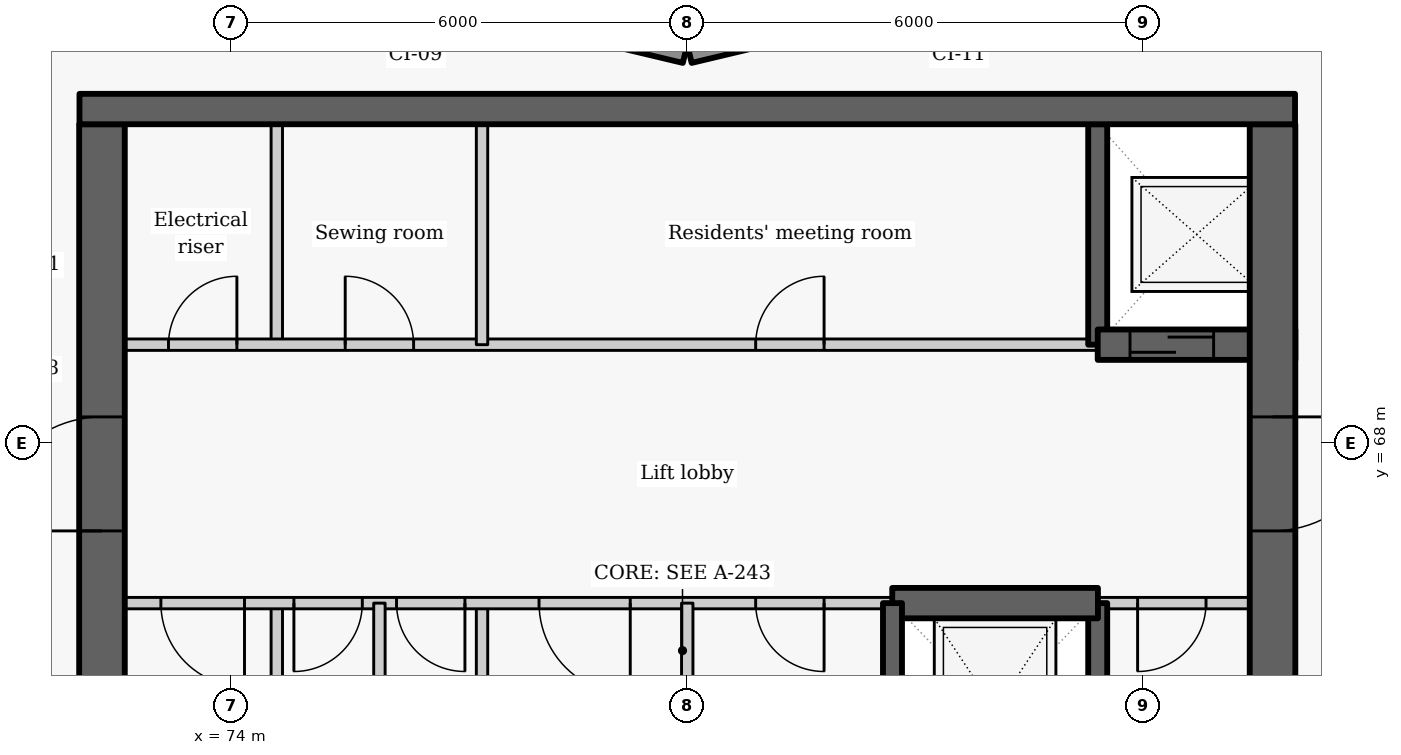
"""IFC4 building model, lengths in metres.
Left out: names, types, materials, properties, quantities, classifications, styles, units other than length and angle.
Written with IfcOpenShell. Run it as: python <this file> out.ifc"""

import sys

from ifc_helpers import new_model, si_unit, direction, frame, frame_2d, origin, place, context, subcontext, project, spatial, rectangle, extrude, element, fill, save


model = new_model("IFC4")
c1 = context("Model", 3, precision=1e-05, world=origin(), true_north=direction((0.0, 1.0)))
c2 = subcontext(c1, "Body", "Model", "MODEL_VIEW")
j1 = project(units=[si_unit("LENGTHUNIT", "METRE"), si_unit("PLANEANGLEUNIT", "RADIAN")], contexts=[c1])
p1 = place(None, origin())
s1 = spatial("IfcSite", under=j1, at=p1, CompositionType="ELEMENT")
p2 = place(p1, origin())
s2 = spatial("IfcBuilding", under=s1, at=p2, CompositionType="ELEMENT")
p3 = place(p2, frame((0.0, 0.0, 259.2)))
s3 = spatial("IfcBuildingStorey", under=s2, at=p3, CompositionType="ELEMENT", Elevation=259.2)
for number, where, z_axis, x_axis in (
    (1, (83.186, 73.881, 0.0), (0.0, 0.0, 1.0), (-0.973, -0.232, 0.0)),
    (2, (79.971, 73.128, 0.0), (0.0, 0.0, 1.0), (-0.973, 0.232, 0.0)),
):
    element("IfcWall", number, at=place(p3, frame(where, z_axis=z_axis, x_axis=x_axis)), inside=s3, PredefinedType="SOLIDWALL", context=c2, shape_type="SweptSolid", body=[
        extrude(rectangle(XDim=3.246, YDim=0.25, at=frame_2d((1.623, 0.0))), origin(), (0.0, 0.0, 1.0), 2.425),
    ])
p4 = place(p3, frame((74.6, 63.1, 0.0), z_axis=(0.0, 0.0, 1.0), x_axis=(0.0, 1.0, 0.0)))
e3 = element("IfcWall", 3, at=p4, inside=s3, PredefinedType="PARTITIONING", context=c2, shape_type="SweptSolid", body=[
    extrude(rectangle(XDim=2.8, YDim=0.15, at=frame_2d((1.4, 0.0))), origin(), (0.0, 0.0, 1.0), 3.025),
])
p5 = place(p3, frame((74.6, 69.3, 0.0), z_axis=(0.0, 0.0, 1.0), x_axis=(0.0, 1.0, 0.0)))
e4 = element("IfcWall", 4, at=p5, inside=s3, PredefinedType="PARTITIONING", context=c2, shape_type="SweptSolid", body=[
    extrude(rectangle(XDim=2.9, YDim=0.15, at=frame_2d((1.45, 0.0))), origin(), (0.0, 0.0, 1.0), 3.025),
])
p6 = place(p3, frame((72.0, 69.3, 0.0), z_axis=(0.0, 0.0, 1.0), x_axis=(1.0, 0.0, 0.0)))
e5 = element("IfcWall", 5, at=p6, inside=s3, PredefinedType="PARTITIONING", context=c2, shape_type="SweptSolid", body=[
    extrude(rectangle(XDim=13.4, YDim=0.15, at=frame_2d((6.7, 0.0))), origin(), (0.0, 0.0, 1.0), 3.025),
])
p7 = place(p6, frame((1.175, 0.0, 0.0)))
e6 = element("IfcOpeningElement", 6, at=p7, cuts=e5, PredefinedType="OPENING", context=c2, shape_type="SweptSolid", body=[
    extrude(rectangle(XDim=0.9, YDim=2.1, at=frame_2d((0.45, 1.05))), frame((0.0, 0.085, 0.0), z_axis=(0.0, -1.0, 0.0), x_axis=(1.0, 0.0, 0.0)), (0.0, 0.0, 1.0), 0.17),
])
p8 = place(p6, frame((3.5, 0.0, 0.0)))
e7 = element("IfcOpeningElement", 7, at=p8, cuts=e5, PredefinedType="OPENING", context=c2, shape_type="SweptSolid", body=[
    extrude(rectangle(XDim=0.9, YDim=2.1, at=frame_2d((0.45, 1.05))), frame((0.0, 0.085, 0.0), z_axis=(0.0, -1.0, 0.0), x_axis=(1.0, 0.0, 0.0)), (0.0, 0.0, 1.0), 0.17),
])
p9 = place(p6, frame((8.9, 0.0, 0.0)))
e8 = element("IfcOpeningElement", 8, at=p9, cuts=e5, PredefinedType="OPENING", context=c2, shape_type="SweptSolid", body=[
    extrude(rectangle(XDim=0.9, YDim=2.1, at=frame_2d((0.45, 1.05))), frame((0.0, 0.085, 0.0), z_axis=(0.0, -1.0, 0.0), x_axis=(1.0, 0.0, 0.0)), (0.0, 0.0, 1.0), 0.17),
])
p10 = place(p3, frame((72.3, 63.1, -0.275), z_axis=(0.0, 0.0, 1.0), x_axis=(0.0, 1.0, 0.0)))
e9 = element("IfcWall", 9, at=p10, inside=s3, PredefinedType="SHEAR", context=c2, shape_type="SweptSolid", body=[
    extrude(rectangle(XDim=9.1, YDim=0.6, at=frame_2d((4.55, 0.0))), origin(), (0.0, 0.0, 1.0), 3.3),
])
p11 = place(p10, frame((3.75, 0.0, 0.275)))
e10 = element("IfcOpeningElement", 10, at=p11, cuts=e9, PredefinedType="OPENING", context=c2, shape_type="SweptSolid", body=[
    extrude(rectangle(XDim=1.5, YDim=2.1, at=frame_2d((0.75, 1.05))), frame((0.0, 0.31, 0.0), z_axis=(0.0, -1.0, 0.0), x_axis=(1.0, 0.0, 0.0)), (0.0, 0.0, 1.0), 0.62),
])
p12 = place(p3, frame((85.4, 63.1, -0.275), z_axis=(0.0, 0.0, 1.0), x_axis=(0.0, 1.0, 0.0)))
e11 = element("IfcWall", 11, at=p12, inside=s3, PredefinedType="SHEAR", context=c2, shape_type="SweptSolid", body=[
    extrude(rectangle(XDim=2.8, YDim=0.25, at=frame_2d((1.4, 0.0))), origin(), (0.0, 0.0, 1.0), 3.3),
])
p13 = place(p3, frame((85.4, 69.3, -0.275), z_axis=(0.0, 0.0, 1.0), x_axis=(0.0, 1.0, 0.0)))
e12 = element("IfcWall", 12, at=p13, inside=s3, PredefinedType="SHEAR", context=c2, shape_type="SweptSolid", body=[
    extrude(rectangle(XDim=2.9, YDim=0.25, at=frame_2d((1.45, 0.0))), origin(), (0.0, 0.0, 1.0), 3.3),
])
p14 = place(p3, frame((85.4, 69.3, -0.275), z_axis=(0.0, 0.0, 1.0), x_axis=(1.0, 0.0, 0.0)))
e13 = element("IfcWall", 13, at=p14, inside=s3, PredefinedType="SHEAR", context=c2, shape_type="SweptSolid", body=[
    extrude(rectangle(XDim=2.6, YDim=0.4, at=frame_2d((1.3, 0.0))), origin(), (0.0, 0.0, 1.0), 3.3),
])
p15 = place(p14, frame((0.425, 0.0, 0.275)))
e14 = element("IfcOpeningElement", 14, at=p15, cuts=e13, PredefinedType="OPENING", context=c2, shape_type="SweptSolid", body=[
    extrude(rectangle(XDim=1.1, YDim=2.1, at=frame_2d((0.55, 1.05))), frame((0.0, 0.21, 0.0), z_axis=(0.0, -1.0, 0.0), x_axis=(1.0, 0.0, 0.0)), (0.0, 0.0, 1.0), 0.42),
])
p16 = place(p3, frame((87.7, 72.2, -0.275), z_axis=(0.0, 0.0, 1.0), x_axis=(0.0, -1.0, 0.0)))
e15 = element("IfcWall", 15, at=p16, inside=s3, PredefinedType="SHEAR", context=c2, shape_type="SweptSolid", body=[
    extrude(rectangle(XDim=14.25, YDim=0.6, at=frame_2d((7.125, 0.0))), origin(), (0.0, 0.0, 1.0), 3.3),
])
p17 = place(p16, frame((3.85, 0.0, 0.275)))
e16 = element("IfcOpeningElement", 16, at=p17, cuts=e15, PredefinedType="OPENING", context=c2, shape_type="SweptSolid", body=[
    extrude(rectangle(XDim=1.5, YDim=2.1, at=frame_2d((0.75, 1.05))), frame((0.0, 0.31, 0.0), z_axis=(0.0, -1.0, 0.0), x_axis=(1.0, 0.0, 0.0)), (0.0, 0.0, 1.0), 0.62),
])
p18 = place(p16, frame((11.125, 0.0, 0.275)))
e17 = element("IfcOpeningElement", 17, at=p18, cuts=e15, PredefinedType="OPENING", context=c2, shape_type="SweptSolid", body=[
    extrude(rectangle(XDim=1.1, YDim=2.1, at=frame_2d((0.55, 1.05))), frame((0.0, 0.31, 0.0), z_axis=(0.0, -1.0, 0.0), x_axis=(1.0, 0.0, 0.0)), (0.0, 0.0, 1.0), 0.62),
])
p19 = place(p3, frame((77.3, 63.1, 0.0), z_axis=(0.0, 0.0, 1.0), x_axis=(0.0, 1.0, 0.0)))
e18 = element("IfcWall", 18, at=p19, inside=s3, PredefinedType="PARTITIONING", context=c2, shape_type="SweptSolid", body=[
    extrude(rectangle(XDim=2.8, YDim=0.15, at=frame_2d((1.4, 0.0))), origin(), (0.0, 0.0, 1.0), 3.025),
])
p20 = place(p3, frame((77.3, 69.3, 0.0), z_axis=(0.0, 0.0, 1.0), x_axis=(0.0, 1.0, 0.0)))
e19 = element("IfcWall", 19, at=p20, inside=s3, PredefinedType="PARTITIONING", context=c2, shape_type="SweptSolid", body=[
    extrude(rectangle(XDim=2.9, YDim=0.15, at=frame_2d((1.45, 0.0))), origin(), (0.0, 0.0, 1.0), 3.025),
])
p21 = place(p3, frame((82.703, 65.9, 0.0), z_axis=(0.0, 0.0, 1.0), x_axis=(-1.0, 0.0, 0.0)))
e20 = element("IfcWall", 20, at=p21, inside=s3, PredefinedType="PARTITIONING", context=c2, shape_type="SweptSolid", body=[
    extrude(rectangle(XDim=10.703, YDim=0.15, at=frame_2d((5.352, 0.0))), origin(), (0.0, 0.0, 1.0), 3.025),
])
p22 = place(p21, frame((8.528, 0.0, 0.0)))
e21 = element("IfcOpeningElement", 21, at=p22, cuts=e20, PredefinedType="OPENING", context=c2, shape_type="SweptSolid", body=[
    extrude(rectangle(XDim=1.1, YDim=2.1, at=frame_2d((0.55, 1.05))), frame((0.0, 0.085, 0.0), z_axis=(0.0, -1.0, 0.0), x_axis=(1.0, 0.0, 0.0)), (0.0, 0.0, 1.0), 0.17),
])
p23 = place(p21, frame((6.978, 0.0, 0.0)))
e22 = element("IfcOpeningElement", 22, at=p23, cuts=e20, PredefinedType="OPENING", context=c2, shape_type="SweptSolid", body=[
    extrude(rectangle(XDim=0.9, YDim=2.1, at=frame_2d((0.45, 1.05))), frame((0.0, 0.085, 0.0), z_axis=(0.0, -1.0, 0.0), x_axis=(1.0, 0.0, 0.0)), (0.0, 0.0, 1.0), 0.17),
])
p24 = place(p21, frame((5.628, 0.0, 0.0)))
e23 = element("IfcOpeningElement", 23, at=p24, cuts=e20, PredefinedType="OPENING", context=c2, shape_type="SweptSolid", body=[
    extrude(rectangle(XDim=0.9, YDim=2.1, at=frame_2d((0.45, 1.05))), frame((0.0, 0.085, 0.0), z_axis=(0.0, -1.0, 0.0), x_axis=(1.0, 0.0, 0.0)), (0.0, 0.0, 1.0), 0.17),
])
p25 = place(p21, frame((3.453, 0.0, 0.0)))
e24 = element("IfcOpeningElement", 24, at=p25, cuts=e20, PredefinedType="OPENING", context=c2, shape_type="SweptSolid", body=[
    extrude(rectangle(XDim=1.2, YDim=2.1, at=frame_2d((0.6, 1.05))), frame((0.0, 0.085, 0.0), z_axis=(0.0, -1.0, 0.0), x_axis=(1.0, 0.0, 0.0)), (0.0, 0.0, 1.0), 0.17),
])
p26 = place(p21, frame((0.903, 0.0, 0.0)))
e25 = element("IfcOpeningElement", 25, at=p26, cuts=e20, PredefinedType="OPENING", context=c2, shape_type="SweptSolid", body=[
    extrude(rectangle(XDim=0.9, YDim=2.1, at=frame_2d((0.45, 1.05))), frame((0.0, 0.085, 0.0), z_axis=(0.0, -1.0, 0.0), x_axis=(1.0, 0.0, 0.0)), (0.0, 0.0, 1.0), 0.17),
])
p27 = place(p3, frame((88.0, 65.9, 0.0), z_axis=(0.0, 0.0, 1.0), x_axis=(-1.0, 0.0, 0.0)))
e26 = element("IfcWall", 26, at=p27, inside=s3, PredefinedType="PARTITIONING", context=c2, shape_type="SweptSolid", body=[
    extrude(rectangle(XDim=2.603, YDim=0.15, at=frame_2d((1.302, 0.0))), origin(), (0.0, 0.0, 1.0), 3.025),
])
p28 = place(p27, frame((1.175, 0.0, 0.0)))
e27 = element("IfcOpeningElement", 27, at=p28, cuts=e26, PredefinedType="OPENING", context=c2, shape_type="SweptSolid", body=[
    extrude(rectangle(XDim=0.9, YDim=2.1, at=frame_2d((0.45, 1.05))), frame((0.0, 0.085, 0.0), z_axis=(0.0, -1.0, 0.0), x_axis=(1.0, 0.0, 0.0)), (0.0, 0.0, 1.0), 0.17),
])
p29 = place(p3, frame((82.697, 65.9, -0.275), z_axis=(0.0, 0.0, 1.0), x_axis=(1.0, 0.0, 0.0)))
e28 = element("IfcWall", 28, at=p29, inside=s3, PredefinedType="SHEAR", context=c2, shape_type="SweptSolid", body=[
    extrude(rectangle(XDim=2.706, YDim=0.4, at=frame_2d((1.353, 0.0))), origin(), (0.0, 0.0, 1.0), 3.3),
])
for number, where, z_axis, x_axis in (
    (29, (75.95, 63.1, 0.0), (0.0, 0.0, 1.0), (0.0, 1.0, 0.0)),
    (30, (80.0, 63.1, 0.0), (0.0, 0.0, 1.0), (0.0, 1.0, 0.0)),
):
    element("IfcWall", number, at=place(p3, frame(where, z_axis=z_axis, x_axis=x_axis)), inside=s3, PredefinedType="PARTITIONING", context=c2, shape_type="SweptSolid", body=[
        extrude(rectangle(XDim=2.8, YDim=0.15, at=frame_2d((1.4, 0.0))), origin(), (0.0, 0.0, 1.0), 3.025),
    ])
p30 = place(p3, frame((82.7, 63.1, -0.275), z_axis=(0.0, 0.0, 1.0), x_axis=(0.0, 1.0, 0.0)))
e31 = element("IfcWall", 31, at=p30, inside=s3, PredefinedType="SHEAR", context=c2, shape_type="SweptSolid", body=[
    extrude(rectangle(XDim=2.8, YDim=0.25, at=frame_2d((1.4, 0.0))), origin(), (0.0, 0.0, 1.0), 3.3),
])
p31 = place(p3, frame((72.004, 72.4, -0.275), z_axis=(0.0, 0.0, 1.0), x_axis=(1.0, 0.0, 0.0)))
e32 = element("IfcWall", 32, at=p31, inside=s3, PredefinedType="SHEAR", context=c2, shape_type="SweptSolid", body=[
    extrude(rectangle(XDim=15.992, YDim=0.4, at=frame_2d((7.996, 0.0))), origin(), (0.0, 0.0, 1.0), 3.3),
])
p32 = place(p7, origin())
e33 = element("IfcDoor", 33, at=p32, inside=s3, OperationType="SINGLE_SWING_RIGHT", PredefinedType="DOOR", context=c2, shape_type="SweptSolid", body=[
    extrude(rectangle(XDim=0.9, YDim=2.1, at=frame_2d((0.45, 1.05))), frame((0.0, 0.025, 0.0), z_axis=(0.0, -1.0, 0.0), x_axis=(1.0, 0.0, 0.0)), (0.0, 0.0, 1.0), 0.05),
])
fill(e6, e33)
p33 = place(p15, origin())
e34 = element("IfcDoor", 34, at=p33, inside=s3, OperationType="SLIDING_TO_LEFT", PredefinedType="DOOR", context=c2, shape_type="SweptSolid", body=[
    extrude(rectangle(XDim=1.1, YDim=2.1, at=frame_2d((0.55, 1.05))), frame((0.0, 0.025, 0.0), z_axis=(0.0, -1.0, 0.0), x_axis=(1.0, 0.0, 0.0)), (0.0, 0.0, 1.0), 0.05),
])
fill(e14, e34)
p34 = place(p8, origin())
e35 = element("IfcDoor", 35, at=p34, inside=s3, OperationType="SINGLE_SWING_LEFT", PredefinedType="DOOR", context=c2, shape_type="SweptSolid", body=[
    extrude(rectangle(XDim=0.9, YDim=2.1, at=frame_2d((0.45, 1.05))), frame((0.0, 0.025, 0.0), z_axis=(0.0, -1.0, 0.0), x_axis=(1.0, 0.0, 0.0)), (0.0, 0.0, 1.0), 0.05),
])
fill(e7, e35)
p35 = place(p9, origin())
e36 = element("IfcDoor", 36, at=p35, inside=s3, OperationType="SINGLE_SWING_RIGHT", PredefinedType="DOOR", context=c2, shape_type="SweptSolid", body=[
    extrude(rectangle(XDim=0.9, YDim=2.1, at=frame_2d((0.45, 1.05))), frame((0.0, 0.025, 0.0), z_axis=(0.0, -1.0, 0.0), x_axis=(1.0, 0.0, 0.0)), (0.0, 0.0, 1.0), 0.05),
])
fill(e8, e36)
p36 = place(p22, origin())
e37 = element("IfcDoor", 37, at=p36, inside=s3, OperationType="SINGLE_SWING_LEFT", PredefinedType="DOOR", context=c2, shape_type="SweptSolid", body=[
    extrude(rectangle(XDim=1.1, YDim=2.1, at=frame_2d((0.55, 1.05))), frame((0.0, 0.025, 0.0), z_axis=(0.0, -1.0, 0.0), x_axis=(1.0, 0.0, 0.0)), (0.0, 0.0, 1.0), 0.05),
])
fill(e21, e37)
p37 = place(p23, origin())
e38 = element("IfcDoor", 38, at=p37, inside=s3, OperationType="SINGLE_SWING_RIGHT", PredefinedType="DOOR", context=c2, shape_type="SweptSolid", body=[
    extrude(rectangle(XDim=0.9, YDim=2.1, at=frame_2d((0.45, 1.05))), frame((0.0, 0.025, 0.0), z_axis=(0.0, -1.0, 0.0), x_axis=(1.0, 0.0, 0.0)), (0.0, 0.0, 1.0), 0.05),
])
fill(e22, e38)
p38 = place(p24, origin())
e39 = element("IfcDoor", 39, at=p38, inside=s3, OperationType="SINGLE_SWING_LEFT", PredefinedType="DOOR", context=c2, shape_type="SweptSolid", body=[
    extrude(rectangle(XDim=0.9, YDim=2.1, at=frame_2d((0.45, 1.05))), frame((0.0, 0.025, 0.0), z_axis=(0.0, -1.0, 0.0), x_axis=(1.0, 0.0, 0.0)), (0.0, 0.0, 1.0), 0.05),
])
fill(e23, e39)
p39 = place(p25, origin())
e40 = element("IfcDoor", 40, at=p39, inside=s3, OperationType="DOUBLE_DOOR_SINGLE_SWING", PredefinedType="DOOR", context=c2, shape_type="SweptSolid", body=[
    extrude(rectangle(XDim=1.2, YDim=2.1, at=frame_2d((0.6, 1.05))), frame((0.0, 0.025, 0.0), z_axis=(0.0, -1.0, 0.0), x_axis=(1.0, 0.0, 0.0)), (0.0, 0.0, 1.0), 0.05),
])
fill(e24, e40)
p40 = place(p26, origin())
e41 = element("IfcDoor", 41, at=p40, inside=s3, OperationType="SINGLE_SWING_LEFT", PredefinedType="DOOR", context=c2, shape_type="SweptSolid", body=[
    extrude(rectangle(XDim=0.9, YDim=2.1, at=frame_2d((0.45, 1.05))), frame((0.0, 0.025, 0.0), z_axis=(0.0, -1.0, 0.0), x_axis=(1.0, 0.0, 0.0)), (0.0, 0.0, 1.0), 0.05),
])
fill(e25, e41)
p41 = place(p28, origin())
e42 = element("IfcDoor", 42, at=p41, inside=s3, OperationType="SINGLE_SWING_RIGHT", PredefinedType="DOOR", context=c2, shape_type="SweptSolid", body=[
    extrude(rectangle(XDim=0.9, YDim=2.1, at=frame_2d((0.45, 1.05))), frame((0.0, 0.025, 0.0), z_axis=(0.0, -1.0, 0.0), x_axis=(1.0, 0.0, 0.0)), (0.0, 0.0, 1.0), 0.05),
])
fill(e27, e42)
p42 = place(p17, origin())
e43 = element("IfcDoor", 43, at=p42, inside=s3, OperationType="DOUBLE_DOOR_SINGLE_SWING", PredefinedType="DOOR", context=c2, shape_type="SweptSolid", body=[
    extrude(rectangle(XDim=1.5, YDim=2.1, at=frame_2d((0.75, 1.05))), frame((0.0, 0.025, 0.0), z_axis=(0.0, -1.0, 0.0), x_axis=(1.0, 0.0, 0.0)), (0.0, 0.0, 1.0), 0.05),
])
fill(e16, e43)
p43 = place(p11, origin())
e44 = element("IfcDoor", 44, at=p43, inside=s3, OperationType="DOUBLE_DOOR_SINGLE_SWING", PredefinedType="DOOR", context=c2, shape_type="SweptSolid", body=[
    extrude(rectangle(XDim=1.5, YDim=2.1, at=frame_2d((0.75, 1.05))), frame((0.0, 0.025, 0.0), z_axis=(0.0, -1.0, 0.0), x_axis=(1.0, 0.0, 0.0)), (0.0, 0.0, 1.0), 0.05),
])
fill(e10, e44)
save(model, sys.argv[1])
